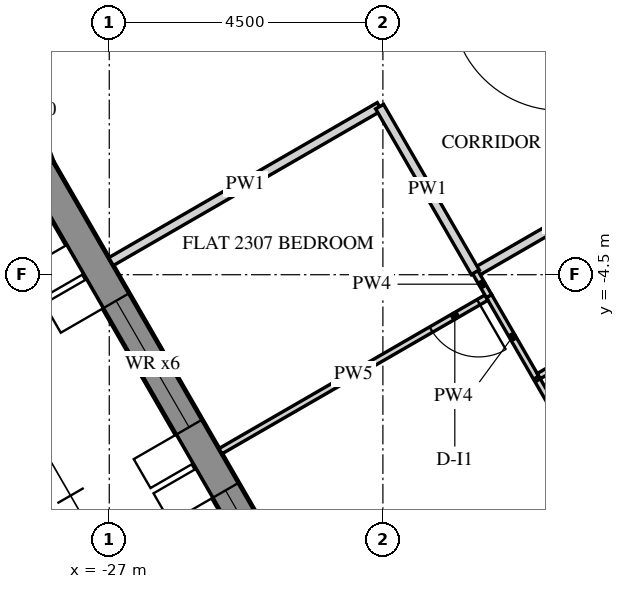
"""IFC4 building model, lengths in metres.
Left out: names, types, materials, properties, quantities, classifications, styles, units other than length and angle.
Written with IfcOpenShell. Run it as: python <this file> out.ifc"""

import sys

from ifc_helpers import new_model, si_unit, direction, frame, frame_2d, origin, place, context, subcontext, project, spatial, polyline, rectangle, outline, extrude, element, fill, save


model = new_model("IFC4")
c1 = context("Model", 3, precision=1e-05, world=origin(), true_north=direction((0.0, 1.0)))
c2 = subcontext(c1, "Body", "Model", "MODEL_VIEW")
j1 = project(units=[si_unit("LENGTHUNIT", "METRE"), si_unit("PLANEANGLEUNIT", "RADIAN")], contexts=[c1])
p1 = place(None, origin())
s1 = spatial("IfcSite", under=j1, at=p1, CompositionType="ELEMENT")
p2 = place(p1, origin())
s2 = spatial("IfcBuilding", under=s1, at=p2, CompositionType="ELEMENT")
p3 = place(p2, frame((0.0, 0.0, 291.3)))
s3 = spatial("IfcBuildingStorey", under=s2, at=p3, CompositionType="ELEMENT", Elevation=291.3)
p4 = place(p3, frame((-28.578, -1.606, -0.15), z_axis=(0.0, 0.0, 1.0), x_axis=(0.352838463023, -0.935684251771, 0.0)))
e1 = element("IfcWall", 1, at=p4, inside=s3, PredefinedType="SOLIDWALL", context=c2, shape_type="SweptSolid", body=[
    extrude(outline(polyline([(-0.041, -0.25), (1.237, -0.25), (1.196, 0.25), (0.041, 0.25), (-0.041, -0.25)])), origin(), (0.0, 0.0, 1.0), 3.9),
])
p5 = place(p3, frame((-28.149, -2.745, -0.15), z_axis=(0.0, 0.0, 1.0), x_axis=(0.500003737743, -0.866023245787, 0.0)))
e2 = element("IfcWall", 2, at=p5, inside=s3, PredefinedType="SOLIDWALL", context=c2, shape_type="SweptSolid", body=[
    extrude(outline(polyline([(-0.021, -0.25), (25.468, -0.25), (25.421, 0.25), (0.021, 0.25), (-0.021, -0.25)])), origin(), (0.0, 0.0, 1.0), 3.9),
])
p6 = place(p5, frame((2.522, 0.0, 0.75)))
e3 = element("IfcOpeningElement", 3, at=p6, cuts=e2, PredefinedType="OPENING", context=c2, shape_type="SweptSolid", body=[
    extrude(rectangle(XDim=2.4, YDim=2.7, at=frame_2d((1.2, 1.35))), frame((0.0, 0.26, 0.0), z_axis=(0.0, -1.0, 0.0), x_axis=(1.0, 0.0, 0.0)), (0.0, 0.0, 1.0), 0.52),
])
p7 = place(p5, frame((6.122, 0.0, 0.75)))
e4 = element("IfcOpeningElement", 4, at=p7, cuts=e2, PredefinedType="OPENING", context=c2, shape_type="SweptSolid", body=[
    extrude(rectangle(XDim=2.4, YDim=2.7, at=frame_2d((1.2, 1.35))), frame((0.0, 0.26, 0.0), z_axis=(0.0, -1.0, 0.0), x_axis=(1.0, 0.0, 0.0)), (0.0, 0.0, 1.0), 0.52),
])
p8 = place(p5, frame((9.722, 0.0, 0.75)))
e5 = element("IfcOpeningElement", 5, at=p8, cuts=e2, PredefinedType="OPENING", context=c2, shape_type="SweptSolid", body=[
    extrude(rectangle(XDim=2.4, YDim=2.7, at=frame_2d((1.2, 1.35))), frame((0.0, 0.26, 0.0), z_axis=(0.0, -1.0, 0.0), x_axis=(1.0, 0.0, 0.0)), (0.0, 0.0, 1.0), 0.52),
])
p9 = place(p5, frame((13.323, 0.0, 0.75)))
e6 = element("IfcOpeningElement", 6, at=p9, cuts=e2, PredefinedType="OPENING", context=c2, shape_type="SweptSolid", body=[
    extrude(rectangle(XDim=2.4, YDim=2.7, at=frame_2d((1.2, 1.35))), frame((0.0, 0.26, 0.0), z_axis=(0.0, -1.0, 0.0), x_axis=(1.0, 0.0, 0.0)), (0.0, 0.0, 1.0), 0.52),
])
p10 = place(p5, frame((16.922, 0.0, 0.75)))
e7 = element("IfcOpeningElement", 7, at=p10, cuts=e2, PredefinedType="OPENING", context=c2, shape_type="SweptSolid", body=[
    extrude(rectangle(XDim=2.4, YDim=2.7, at=frame_2d((1.2, 1.35))), frame((0.0, 0.26, 0.0), z_axis=(0.0, -1.0, 0.0), x_axis=(1.0, 0.0, 0.0)), (0.0, 0.0, 1.0), 0.52),
])
p11 = place(p5, frame((20.522, 0.0, 0.75)))
e8 = element("IfcOpeningElement", 8, at=p11, cuts=e2, PredefinedType="OPENING", context=c2, shape_type="SweptSolid", body=[
    extrude(rectangle(XDim=2.4, YDim=2.7, at=frame_2d((1.2, 1.35))), frame((0.0, 0.26, 0.0), z_axis=(0.0, -1.0, 0.0), x_axis=(1.0, 0.0, 0.0)), (0.0, 0.0, 1.0), 0.52),
])
p12 = place(p3, frame((-20.98, -4.461, 0.0), z_axis=(0.0, 0.0, 1.0), x_axis=(0.866038511948, 0.499977295307, 0.0)))
e9 = element("IfcWall", 9, at=p12, inside=s3, PredefinedType="PARTITIONING", context=c2, shape_type="SweptSolid", body=[
    extrude(rectangle(XDim=3.4, YDim=0.15, at=frame_2d((1.7, 0.0))), origin(), (0.0, 0.0, 1.0), 2.988),
])
p13 = place(p3, frame((-26.971, -4.284, 0.0), z_axis=(0.0, 0.0, 1.0), x_axis=(0.866024511559, 0.500001545377, 0.0)))
e10 = element("IfcWall", 10, at=p13, inside=s3, PredefinedType="PARTITIONING", context=c2, shape_type="SweptSolid", body=[
    extrude(rectangle(XDim=5.099, YDim=0.15, at=frame_2d((2.549, 0.0))), origin(), (0.0, 0.0, 1.0), 2.988),
])
p14 = place(p3, frame((-22.554, -1.736, 0.0), z_axis=(0.0, 0.0, 1.0), x_axis=(0.50003099832, -0.866007506156, 0.0)))
e11 = element("IfcWall", 11, at=p14, inside=s3, PredefinedType="PARTITIONING", context=c2, shape_type="SweptSolid", body=[
    extrude(rectangle(XDim=3.151, YDim=0.15, at=frame_2d((1.575, 0.0))), origin(), (0.0, 0.0, 1.0), 2.988),
])
p15 = place(p3, frame((-18.705, -8.402, 0.0), z_axis=(0.0, 0.0, 1.0), x_axis=(-0.500004234368, 0.866022959057, 0.0)))
e12 = element("IfcWall", 12, at=p15, inside=s3, PredefinedType="PARTITIONING", context=c2, shape_type="SweptSolid", body=[
    extrude(rectangle(XDim=2.5, YDim=0.1, at=frame_2d((1.25, 0.0))), origin(), (0.0, 0.0, 1.0), 2.988),
])
p16 = place(p3, frame((-19.98, -6.193, 0.0), z_axis=(0.0, 0.0, 1.0), x_axis=(-0.500067724834, 0.865986299303, 0.0)))
e13 = element("IfcWall", 13, at=p16, inside=s3, PredefinedType="PARTITIONING", context=c2, shape_type="SweptSolid", body=[
    extrude(rectangle(XDim=1.551, YDim=0.1, at=frame_2d((0.775, 0.0))), origin(), (0.0, 0.0, 1.0), 2.988),
])
p17 = place(p3, frame((-20.798, -4.877, 0.0), z_axis=(0.0, 0.0, 1.0), x_axis=(-0.866026981659, -0.499997267031, 0.0)))
e14 = element("IfcWall", 14, at=p17, inside=s3, PredefinedType="PARTITIONING", context=c2, shape_type="SweptSolid", body=[
    extrude(rectangle(XDim=5.05, YDim=0.1, at=frame_2d((2.525, 0.0))), origin(), (0.0, 0.0, 1.0), 2.988),
])
p18 = place(p17, frame((0.15, 0.0, 0.0)))
e15 = element("IfcOpeningElement", 15, at=p18, cuts=e14, PredefinedType="OPENING", context=c2, shape_type="SweptSolid", body=[
    extrude(rectangle(XDim=0.9, YDim=2.1, at=frame_2d((0.45, 1.05))), frame((0.0, 0.06, 0.0), z_axis=(0.0, -1.0, 0.0), x_axis=(1.0, 0.0, 0.0)), (0.0, 0.0, 1.0), 0.12),
])
p19 = place(p3, frame((-17.101, -4.531, 0.0), z_axis=(0.0, 0.0, 1.0), x_axis=(-0.866046559086, -0.499963356153, 0.0)))
e16 = element("IfcWall", 16, at=p19, inside=s3, PredefinedType="PARTITIONING", context=c2, shape_type="SweptSolid", body=[
    extrude(rectangle(XDim=3.275, YDim=0.1, at=frame_2d((1.638, 0.0))), origin(), (0.0, 0.0, 1.0), 2.988),
])
p20 = place(p19, frame((1.225, 0.0, 0.0)))
e17 = element("IfcOpeningElement", 17, at=p20, cuts=e16, PredefinedType="OPENING", context=c2, shape_type="SweptSolid", body=[
    extrude(rectangle(XDim=0.8, YDim=2.1, at=frame_2d((0.4, 1.05))), frame((0.0, 0.06, 0.0), z_axis=(0.0, -1.0, 0.0), x_axis=(1.0, 0.0, 0.0)), (0.0, 0.0, 1.0), 0.12),
])
p21 = place(p3, frame((-20.981, -4.459, 0.0), z_axis=(0.0, 0.0, 1.0), x_axis=(0.499846793097, -0.866113839764, 0.0)))
e18 = element("IfcWall", 18, at=p21, inside=s3, PredefinedType="PARTITIONING", context=c2, shape_type="SweptSolid", body=[
    extrude(rectangle(XDim=0.453, YDim=0.1, at=frame_2d((0.227, 0.0))), origin(), (0.0, 0.0, 1.0), 2.988),
])
p22 = place(p6, frame((0.0, 0.18, 0.0)))
e19 = element("IfcWindow", 19, at=p22, inside=s3, PartitioningType="DOUBLE_PANEL_VERTICAL", PredefinedType="WINDOW", context=c2, shape_type="SweptSolid", body=[
    extrude(rectangle(XDim=2.4, YDim=2.7, at=frame_2d((1.2, 1.35))), frame((0.0, 0.03, 0.0), z_axis=(0.0, -1.0, 0.0), x_axis=(1.0, 0.0, 0.0)), (0.0, 0.0, 1.0), 0.06),
])
fill(e3, e19)
p23 = place(p7, frame((0.0, 0.18, 0.0)))
e20 = element("IfcWindow", 20, at=p23, inside=s3, PartitioningType="DOUBLE_PANEL_VERTICAL", PredefinedType="WINDOW", context=c2, shape_type="SweptSolid", body=[
    extrude(rectangle(XDim=2.4, YDim=2.7, at=frame_2d((1.2, 1.35))), frame((0.0, 0.03, 0.0), z_axis=(0.0, -1.0, 0.0), x_axis=(1.0, 0.0, 0.0)), (0.0, 0.0, 1.0), 0.06),
])
fill(e4, e20)
p24 = place(p18, origin())
e21 = element("IfcDoor", 21, at=p24, inside=s3, OperationType="SINGLE_SWING_RIGHT", PredefinedType="DOOR", context=c2, shape_type="SweptSolid", body=[
    extrude(rectangle(XDim=0.9, YDim=2.1, at=frame_2d((0.45, 1.05))), frame((0.0, 0.025, 0.0), z_axis=(0.0, -1.0, 0.0), x_axis=(1.0, 0.0, 0.0)), (0.0, 0.0, 1.0), 0.05),
])
fill(e15, e21)
save(model, sys.argv[1])
